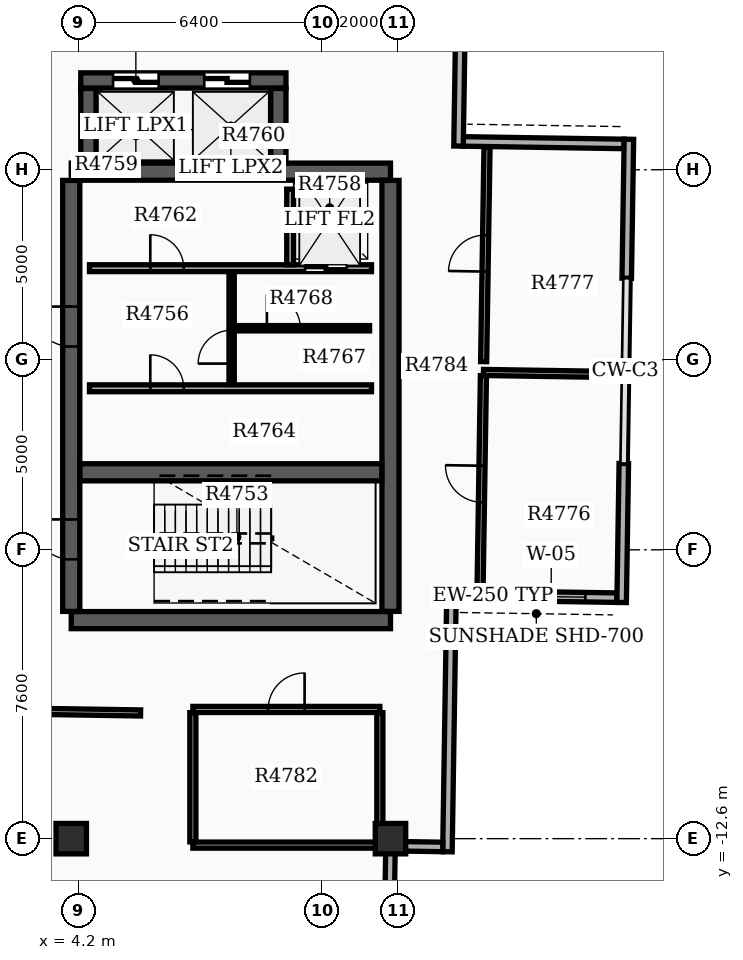
"""IFC4 building model, lengths in metres.
Left out: names, types, materials, properties, quantities, classifications, styles, units other than length and angle.
Written with IfcOpenShell. Run it as: python <this file> out.ifc"""

import sys

from ifc_helpers import new_model, si_unit, direction, frame, frame_2d, origin, origin_2d, place, context, subcontext, project, spatial, rectangle, extrude, element, fill, save


model = new_model("IFC4")
c1 = context("Model", 3, precision=1e-05, world=origin(), true_north=direction((0.0, 1.0)))
c2 = subcontext(c1, "Body", "Model", "MODEL_VIEW")
j1 = project(units=[si_unit("LENGTHUNIT", "METRE"), si_unit("PLANEANGLEUNIT", "RADIAN")], contexts=[c1])
p1 = place(None, origin())
s1 = spatial("IfcSite", under=j1, at=p1, CompositionType="ELEMENT")
p2 = place(p1, origin())
s2 = spatial("IfcBuilding", under=s1, at=p2, CompositionType="ELEMENT")
p3 = place(p2, frame((0.0, 0.0, 312.9)))
s3 = spatial("IfcBuildingStorey", under=s2, at=p3, CompositionType="ELEMENT", Elevation=312.9)
for number, where, z_axis, x_axis in (
    (1, (4.0, -6.85, 0.0), (0.0, 0.0, 1.0), (1.0, 0.0, 0.0)),
    (2, (4.0, 4.95, 0.0), (0.0, 0.0, 1.0), (1.0, 0.0, 0.0)),
):
    element("IfcWall", number, at=place(p3, frame(where, z_axis=z_axis, x_axis=x_axis)), inside=s3, PredefinedType="SHEAR", context=c2, shape_type="SweptSolid", body=[
        extrude(rectangle(XDim=8.4, YDim=0.45, at=frame_2d((4.2, 0.0))), origin(), (0.0, 0.0, 1.0), 4.25),
    ])
p4 = place(p3, frame((4.0, -6.62, 0.0), z_axis=(0.0, 0.0, 1.0), x_axis=(0.0, 1.0, 0.0)))
e3 = element("IfcWall", 3, at=p4, inside=s3, PredefinedType="SHEAR", context=c2, shape_type="SweptSolid", body=[
    extrude(rectangle(XDim=11.34, YDim=0.45, at=frame_2d((5.67, 0.0))), origin(), (0.0, 0.0, 1.0), 4.25),
])
p5 = place(p4, frame((1.37, 0.0, 0.0)))
e4 = element("IfcOpeningElement", 4, at=p5, cuts=e3, PredefinedType="OPENING", context=c2, shape_type="SweptSolid", body=[
    extrude(rectangle(XDim=1.05, YDim=2.15, at=frame_2d((0.525, 1.075))), frame((0.0, 0.235, 0.0), z_axis=(0.0, -1.0, 0.0), x_axis=(1.0, 0.0, 0.0)), (0.0, 0.0, 1.0), 0.47),
])
p6 = place(p4, frame((6.97, 0.0, 0.0)))
e5 = element("IfcOpeningElement", 5, at=p6, cuts=e3, PredefinedType="OPENING", context=c2, shape_type="SweptSolid", body=[
    extrude(rectangle(XDim=1.05, YDim=2.15, at=frame_2d((0.525, 1.075))), frame((0.0, 0.235, 0.0), z_axis=(0.0, -1.0, 0.0), x_axis=(1.0, 0.0, 0.0)), (0.0, 0.0, 1.0), 0.47),
])
p7 = place(p3, frame((12.4, -6.62, 0.0), z_axis=(0.0, 0.0, 1.0), x_axis=(0.0, 1.0, 0.0)))
e6 = element("IfcWall", 6, at=p7, inside=s3, PredefinedType="SHEAR", context=c2, shape_type="SweptSolid", body=[
    extrude(rectangle(XDim=11.34, YDim=0.45, at=frame_2d((5.67, 0.0))), origin(), (0.0, 0.0, 1.0), 4.25),
])
p8 = place(p3, frame((4.23, -2.96, 0.0), z_axis=(0.0, 0.0, 1.0), x_axis=(1.0, 0.0, 0.0)))
e7 = element("IfcWall", 7, at=p8, inside=s3, PredefinedType="SHEAR", context=c2, shape_type="SweptSolid", body=[
    extrude(rectangle(XDim=7.94, YDim=0.45, at=frame_2d((3.97, 0.0))), origin(), (0.0, 0.0, 1.0), 4.25),
])
p9 = place(p3, frame((4.45, 5.18, 0.0), z_axis=(0.0, 0.0, 1.0), x_axis=(0.0, 1.0, 0.0)))
e8 = element("IfcWall", 8, at=p9, inside=s3, PredefinedType="SHEAR", context=c2, shape_type="SweptSolid", body=[
    extrude(rectangle(XDim=1.96, YDim=0.4, at=frame_2d((0.98, 0.0))), origin(), (0.0, 0.0, 1.0), 4.25),
])
p10 = place(p3, frame((4.25, 7.35, 0.0), z_axis=(0.0, 0.0, 1.0), x_axis=(1.0, 0.0, 0.0)))
e9 = element("IfcWall", 9, at=p10, inside=s3, PredefinedType="SHEAR", context=c2, shape_type="SweptSolid", body=[
    extrude(rectangle(XDim=5.4, YDim=0.4, at=frame_2d((2.7, 0.0))), origin(), (0.0, 0.0, 1.0), 4.25),
])
p11 = place(p10, frame((0.85, 0.0, 0.0)))
e10 = element("IfcOpeningElement", 10, at=p11, cuts=e9, PredefinedType="OPENING", context=c2, shape_type="SweptSolid", body=[
    extrude(rectangle(XDim=1.2, YDim=2.2, at=frame_2d((0.6, 1.1))), frame((0.0, 0.21, 0.0), z_axis=(0.0, -1.0, 0.0), x_axis=(1.0, 0.0, 0.0)), (0.0, 0.0, 1.0), 0.42),
])
p12 = place(p10, frame((3.25, 0.0, 0.0)))
e11 = element("IfcOpeningElement", 11, at=p12, cuts=e9, PredefinedType="OPENING", context=c2, shape_type="SweptSolid", body=[
    extrude(rectangle(XDim=1.2, YDim=2.2, at=frame_2d((0.6, 1.1))), frame((0.0, 0.21, 0.0), z_axis=(0.0, -1.0, 0.0), x_axis=(1.0, 0.0, 0.0)), (0.0, 0.0, 1.0), 0.42),
])
p13 = place(p3, frame((9.45, 5.18, 0.0), z_axis=(0.0, 0.0, 1.0), x_axis=(0.0, 1.0, 0.0)))
e12 = element("IfcWall", 12, at=p13, inside=s3, PredefinedType="SHEAR", context=c2, shape_type="SweptSolid", body=[
    extrude(rectangle(XDim=1.96, YDim=0.4, at=frame_2d((0.98, 0.0))), origin(), (0.0, 0.0, 1.0), 4.25),
])
for number, where, z_axis, x_axis in (
    (13, (12.4, -12.6, 0.0), (0.0, 0.0, 1.0), (1.0, 0.0, 0.0)),
    (14, (4.0, -12.6, 0.0), (0.0, 0.0, 1.0), (1.0, 0.0, 0.0)),
):
    element("IfcColumn", number, at=place(p3, frame(where, z_axis=z_axis, x_axis=x_axis)), inside=s3, PredefinedType="COLUMN", context=c2, shape_type="SweptSolid", body=[
        extrude(rectangle(XDim=0.8, YDim=0.8, at=origin_2d()), origin(), (0.0, 0.0, 1.0), 4.5),
    ])
p14 = place(p3, frame((14.129, -6.193, 0.0), z_axis=(0.0, 0.0, 1.0), x_axis=(0.999876765821, -0.015698827078, 0.0)))
e15 = element("IfcWall", 15, at=p14, inside=s3, PredefinedType="STANDARD", context=c2, shape_type="SweptSolid", body=[
    extrude(rectangle(XDim=4.23, YDim=0.25, at=frame_2d((2.115, 0.0))), origin(), (0.0, 0.0, 1.0), 3.73),
])
p15 = place(p14, frame((1.6, 0.0, 0.8)))
e16 = element("IfcOpeningElement", 16, at=p15, cuts=e15, PredefinedType="OPENING", context=c2, shape_type="SweptSolid", body=[
    extrude(rectangle(XDim=1.8, YDim=1.8, at=frame_2d((0.9, 0.9))), frame((0.0, 0.135, 0.0), z_axis=(0.0, -1.0, 0.0), x_axis=(1.0, 0.0, 0.0)), (0.0, 0.0, 1.0), 0.27),
])
p16 = place(p3, frame((18.546, 5.679, 0.0), z_axis=(0.0, 0.0, 1.0), x_axis=(-0.999876765821, 0.015698827078, 0.0)))
e17 = element("IfcWall", 17, at=p16, inside=s3, PredefinedType="STANDARD", context=c2, shape_type="SweptSolid", body=[
    extrude(rectangle(XDim=4.23, YDim=0.25, at=frame_2d((2.115, 0.0))), origin(), (0.0, 0.0, 1.0), 3.73),
])
p17 = place(p3, frame((18.482, -6.386, 0.0), z_axis=(0.0, 0.0, 1.0), x_axis=(0.015688794617, 0.999876923288, 0.0)))
e18 = element("IfcWall", 18, at=p17, inside=s3, PredefinedType="STANDARD", context=c2, shape_type="SweptSolid", body=[
    extrude(rectangle(XDim=3.657, YDim=0.25, at=frame_2d((1.829, 0.0))), origin(), (0.0, 0.0, 1.0), 3.73),
])
p18 = place(p3, frame((18.616, 2.146, 0.0), z_axis=(0.0, 0.0, 1.0), x_axis=(0.015687747418, 0.999876939719, 0.0)))
e19 = element("IfcWall", 19, at=p18, inside=s3, PredefinedType="STANDARD", context=c2, shape_type="SweptSolid", body=[
    extrude(rectangle(XDim=3.657, YDim=0.25, at=frame_2d((1.829, 0.0))), origin(), (0.0, 0.0, 1.0), 3.73),
])
p19 = place(p3, frame((14.19, 5.623, 0.0), z_axis=(0.0, 0.0, 1.0), x_axis=(0.015684623239, 0.999876988731, 0.0)))
e20 = element("IfcWall", 20, at=p19, inside=s3, PredefinedType="STANDARD", context=c2, shape_type="SweptSolid", body=[
    extrude(rectangle(XDim=6.88, YDim=0.25, at=frame_2d((3.44, 0.0))), origin(), (0.0, 0.0, 1.0), 3.73),
])
p20 = place(p3, frame((14.007, -6.066, 0.0), z_axis=(0.0, 0.0, 1.0), x_axis=(-0.01572065784, -0.999876422823, 0.0)))
e21 = element("IfcWall", 21, at=p20, inside=s3, PredefinedType="STANDARD", context=c2, shape_type="SweptSolid", body=[
    extrude(rectangle(XDim=6.88, YDim=0.25, at=frame_2d((3.44, 0.0))), origin(), (0.0, 0.0, 1.0), 3.73),
])
p21 = place(p3, frame((13.775, -12.818, 0.0), z_axis=(0.0, 0.0, 1.0), x_axis=(-0.999874882342, 0.0158183331, 0.0)))
e22 = element("IfcWall", 22, at=p21, inside=s3, PredefinedType="STANDARD", context=c2, shape_type="SweptSolid", body=[
    extrude(rectangle(XDim=1.25, YDim=0.25, at=frame_2d((0.625, 0.0))), origin(), (0.0, 0.0, 1.0), 3.73),
])
p22 = place(p3, frame((12.399, -12.921, 0.0), z_axis=(0.0, 0.0, 1.0), x_axis=(-0.015788362288, -0.99987535604, 0.0)))
e23 = element("IfcWall", 23, at=p22, inside=s3, PredefinedType="STANDARD", context=c2, shape_type="SweptSolid", body=[
    extrude(rectangle(XDim=1.5, YDim=0.25, at=frame_2d((0.75, 0.0))), origin(), (0.0, 0.0, 1.0), 3.73),
])
p23 = place(p3, frame((4.48, 2.41, 0.0), z_axis=(0.0, 0.0, 1.0), x_axis=(1.0, 0.0, 0.0)))
e24 = element("IfcWall", 24, at=p23, inside=s3, PredefinedType="SOLIDWALL", context=c2, shape_type="SweptSolid", body=[
    extrude(rectangle(XDim=7.42, YDim=0.18, at=frame_2d((3.71, 0.0))), origin(), (0.0, 0.0, 1.0), 3.72),
])
p24 = place(p23, frame((5.67, 0.0, 0.0)))
e25 = element("IfcOpeningElement", 25, at=p24, cuts=e24, PredefinedType="OPENING", context=c2, shape_type="SweptSolid", body=[
    extrude(rectangle(XDim=1.1, YDim=2.15, at=frame_2d((0.55, 1.075))), frame((0.0, 0.1, 0.0), z_axis=(0.0, -1.0, 0.0), x_axis=(1.0, 0.0, 0.0)), (0.0, 0.0, 1.0), 0.2),
])
p25 = place(p23, frame((1.6, 0.0, 0.0)))
e26 = element("IfcOpeningElement", 26, at=p25, cuts=e24, PredefinedType="OPENING", context=c2, shape_type="SweptSolid", body=[
    extrude(rectangle(XDim=0.88, YDim=2.1, at=frame_2d((0.44, 1.05))), frame((0.0, 0.1, 0.0), z_axis=(0.0, -1.0, 0.0), x_axis=(1.0, 0.0, 0.0)), (0.0, 0.0, 1.0), 0.2),
])
p26 = place(p3, frame((4.48, -0.75, 0.0), z_axis=(0.0, 0.0, 1.0), x_axis=(1.0, 0.0, 0.0)))
e27 = element("IfcWall", 27, at=p26, inside=s3, PredefinedType="SOLIDWALL", context=c2, shape_type="SweptSolid", body=[
    extrude(rectangle(XDim=7.42, YDim=0.18, at=frame_2d((3.71, 0.0))), origin(), (0.0, 0.0, 1.0), 3.72),
])
p27 = place(p26, frame((1.6, 0.0, 0.0)))
e28 = element("IfcOpeningElement", 28, at=p27, cuts=e27, PredefinedType="OPENING", context=c2, shape_type="SweptSolid", body=[
    extrude(rectangle(XDim=0.88, YDim=2.1, at=frame_2d((0.44, 1.05))), frame((0.0, 0.1, 0.0), z_axis=(0.0, -1.0, 0.0), x_axis=(1.0, 0.0, 0.0)), (0.0, 0.0, 1.0), 0.2),
])
p28 = place(p3, frame((9.76, 2.5, 0.0), z_axis=(0.0, 0.0, 1.0), x_axis=(0.0, 1.0, 0.0)))
e29 = element("IfcWall", 29, at=p28, inside=s3, PredefinedType="SOLIDWALL", context=c2, shape_type="SweptSolid", body=[
    extrude(rectangle(XDim=1.99, YDim=0.18, at=frame_2d((0.995, 0.0))), origin(), (0.0, 0.0, 1.0), 3.72),
])
p29 = place(p3, frame((8.22, -0.65, 0.0), z_axis=(0.0, 0.0, 1.0), x_axis=(0.0, 1.0, 0.0)))
e30 = element("IfcWall", 30, at=p29, inside=s3, PredefinedType="SOLIDWALL", context=c2, shape_type="SweptSolid", body=[
    extrude(rectangle(XDim=2.96, YDim=0.14, at=frame_2d((1.48, 0.0))), origin(), (0.0, 0.0, 1.0), 3.72),
])
p30 = place(p29, frame((0.55, 0.0, 0.0)))
e31 = element("IfcOpeningElement", 31, at=p30, cuts=e30, PredefinedType="OPENING", context=c2, shape_type="SweptSolid", body=[
    extrude(rectangle(XDim=0.88, YDim=2.1, at=frame_2d((0.44, 1.05))), frame((0.0, 0.08, 0.0), z_axis=(0.0, -1.0, 0.0), x_axis=(1.0, 0.0, 0.0)), (0.0, 0.0, 1.0), 0.16),
])
p31 = place(p3, frame((8.298, 0.83, 0.0), z_axis=(0.0, 0.0, 1.0), x_axis=(1.0, 0.0, 0.0)))
e32 = element("IfcWall", 32, at=p31, inside=s3, PredefinedType="PARTITIONING", context=c2, shape_type="SweptSolid", body=[
    extrude(rectangle(XDim=3.552, YDim=0.14, at=frame_2d((1.776, 0.0))), origin(), (0.0, 0.0, 1.0), 3.72),
])
p32 = place(p31, frame((0.85, 0.0, 0.0)))
e33 = element("IfcOpeningElement", 33, at=p32, cuts=e32, PredefinedType="OPENING", context=c2, shape_type="SweptSolid", body=[
    extrude(rectangle(XDim=0.88, YDim=2.1, at=frame_2d((0.44, 1.05))), frame((0.0, 0.08, 0.0), z_axis=(0.0, -1.0, 0.0), x_axis=(1.0, 0.0, 0.0)), (0.0, 0.0, 1.0), 0.16),
])
p33 = place(p3, frame((-0.044, -9.2, 0.0), z_axis=(0.0, 0.0, 1.0), x_axis=(0.999877057035, -0.015680268324, 0.0)))
e34 = element("IfcWall", 34, at=p33, inside=s3, PredefinedType="PARTITIONING", context=c2, shape_type="SweptSolid", body=[
    extrude(rectangle(XDim=5.87, YDim=0.16, at=frame_2d((2.935, 0.0))), origin(), (0.0, 0.0, 1.0), 3.72),
])
p34 = place(p33, frame((2.455, 0.0, 0.0)))
e35 = element("IfcOpeningElement", 35, at=p34, cuts=e34, PredefinedType="OPENING", context=c2, shape_type="SweptSolid", body=[
    extrude(rectangle(XDim=0.96, YDim=2.15, at=frame_2d((0.48, 1.075))), frame((0.0, 0.09, 0.0), z_axis=(0.0, -1.0, 0.0), x_axis=(1.0, 0.0, 0.0)), (0.0, 0.0, 1.0), 0.18),
])
p35 = place(p3, frame((14.847, -0.333, 0.0), z_axis=(0.0, 0.0, 1.0), x_axis=(0.999876606353, -0.015708980461, 0.0)))
e36 = element("IfcWall", 36, at=p35, inside=s3, PredefinedType="PARTITIONING", context=c2, shape_type="SweptSolid", body=[
    extrude(rectangle(XDim=3.73, YDim=0.16, at=frame_2d((1.865, 0.0))), origin(), (0.0, 0.0, 1.0), 3.72),
])
p36 = place(p3, frame((14.757, -6.07, 0.0), z_axis=(0.0, 0.0, 1.0), x_axis=(0.01567977253, 0.99987706481, 0.0)))
e37 = element("IfcWall", 37, at=p36, inside=s3, PredefinedType="PARTITIONING", context=c2, shape_type="SweptSolid", body=[
    extrude(rectangle(XDim=5.652, YDim=0.16, at=frame_2d((2.826, 0.0))), origin(), (0.0, 0.0, 1.0), 3.72),
])
p37 = place(p36, frame((2.322, 0.0, 0.0)))
e38 = element("IfcOpeningElement", 38, at=p37, cuts=e37, PredefinedType="OPENING", context=c2, shape_type="SweptSolid", body=[
    extrude(rectangle(XDim=0.96, YDim=2.15, at=frame_2d((0.48, 1.075))), frame((0.0, 0.09, 0.0), z_axis=(0.0, -1.0, 0.0), x_axis=(1.0, 0.0, 0.0)), (0.0, 0.0, 1.0), 0.18),
])
p38 = place(p3, frame((14.851, -0.048, 0.0), z_axis=(0.0, 0.0, 1.0), x_axis=(0.01567977253, 0.99987706481, 0.0)))
e39 = element("IfcWall", 39, at=p38, inside=s3, PredefinedType="PARTITIONING", context=c2, shape_type="SweptSolid", body=[
    extrude(rectangle(XDim=5.652, YDim=0.16, at=frame_2d((2.826, 0.0))), origin(), (0.0, 0.0, 1.0), 3.72),
])
p39 = place(p38, frame((2.37, 0.0, 0.0)))
e40 = element("IfcOpeningElement", 40, at=p39, cuts=e39, PredefinedType="OPENING", context=c2, shape_type="SweptSolid", body=[
    extrude(rectangle(XDim=0.96, YDim=2.15, at=frame_2d((0.48, 1.075))), frame((0.0, 0.09, 0.0), z_axis=(0.0, -1.0, 0.0), x_axis=(1.0, 0.0, 0.0)), (0.0, 0.0, 1.0), 0.18),
])
p40 = place(p3, frame((7.2, -12.77, 0.0), z_axis=(0.0, 0.0, 1.0), x_axis=(1.0, 0.0, 0.0)))
e41 = element("IfcWall", 41, at=p40, inside=s3, PredefinedType="PARTITIONING", context=c2, shape_type="SweptSolid", body=[
    extrude(rectangle(XDim=4.92, YDim=0.16, at=frame_2d((2.46, 0.0))), origin(), (0.0, 0.0, 1.0), 3.72),
])
p41 = place(p3, frame((7.2, -9.2, 0.0), z_axis=(0.0, 0.0, 1.0), x_axis=(1.0, 0.0, 0.0)))
e42 = element("IfcWall", 42, at=p41, inside=s3, PredefinedType="PARTITIONING", context=c2, shape_type="SweptSolid", body=[
    extrude(rectangle(XDim=4.92, YDim=0.16, at=frame_2d((2.46, 0.0))), origin(), (0.0, 0.0, 1.0), 3.72),
])
p42 = place(p41, frame((1.98, 0.0, 0.0)))
e43 = element("IfcOpeningElement", 43, at=p42, cuts=e42, PredefinedType="OPENING", context=c2, shape_type="SweptSolid", body=[
    extrude(rectangle(XDim=0.96, YDim=2.15, at=frame_2d((0.48, 1.075))), frame((0.0, 0.09, 0.0), z_axis=(0.0, -1.0, 0.0), x_axis=(1.0, 0.0, 0.0)), (0.0, 0.0, 1.0), 0.18),
])
for number, where, z_axis, x_axis in (
    (44, (7.2, -12.685, 0.0), (0.0, 0.0, 1.0), (0.0, 1.0, 0.0)),
    (45, (12.12, -12.685, 0.0), (0.0, 0.0, 1.0), (0.0, 1.0, 0.0)),
):
    element("IfcWall", number, at=place(p3, frame(where, z_axis=z_axis, x_axis=x_axis)), inside=s3, PredefinedType="PARTITIONING", context=c2, shape_type="SweptSolid", body=[
        extrude(rectangle(XDim=3.4, YDim=0.16, at=frame_2d((1.7, 0.0))), origin(), (0.0, 0.0, 1.0), 3.72),
    ])
p43 = place(p15, origin())
e46 = element("IfcWindow", 46, at=p43, inside=s3, PartitioningType="SINGLE_PANEL", PredefinedType="WINDOW", context=c2, shape_type="SweptSolid", body=[
    extrude(rectangle(XDim=1.8, YDim=1.8, at=frame_2d((0.9, 0.9))), frame((0.0, 0.03, 0.0), z_axis=(0.0, -1.0, 0.0), x_axis=(1.0, 0.0, 0.0)), (0.0, 0.0, 1.0), 0.06),
])
fill(e16, e46)
p44 = place(p5, origin())
e47 = element("IfcDoor", 47, at=p44, inside=s3, OperationType="SINGLE_SWING_RIGHT", PredefinedType="DOOR", context=c2, shape_type="SweptSolid", body=[
    extrude(rectangle(XDim=1.05, YDim=2.15, at=frame_2d((0.525, 1.075))), frame((0.0, 0.025, 0.0), z_axis=(0.0, -1.0, 0.0), x_axis=(1.0, 0.0, 0.0)), (0.0, 0.0, 1.0), 0.05),
])
fill(e4, e47)
p45 = place(p6, origin())
e48 = element("IfcDoor", 48, at=p45, inside=s3, OperationType="SINGLE_SWING_RIGHT", PredefinedType="DOOR", context=c2, shape_type="SweptSolid", body=[
    extrude(rectangle(XDim=1.05, YDim=2.15, at=frame_2d((0.525, 1.075))), frame((0.0, 0.025, 0.0), z_axis=(0.0, -1.0, 0.0), x_axis=(1.0, 0.0, 0.0)), (0.0, 0.0, 1.0), 0.05),
])
fill(e5, e48)
p46 = place(p24, origin())
e49 = element("IfcDoor", 49, at=p46, inside=s3, OperationType="DOUBLE_DOOR_SLIDING", PredefinedType="DOOR", context=c2, shape_type="SweptSolid", body=[
    extrude(rectangle(XDim=1.1, YDim=2.15, at=frame_2d((0.55, 1.075))), frame((0.0, 0.025, 0.0), z_axis=(0.0, -1.0, 0.0), x_axis=(1.0, 0.0, 0.0)), (0.0, 0.0, 1.0), 0.05),
])
fill(e25, e49)
p47 = place(p11, origin())
e50 = element("IfcDoor", 50, at=p47, inside=s3, OperationType="DOUBLE_DOOR_SLIDING", PredefinedType="DOOR", context=c2, shape_type="SweptSolid", body=[
    extrude(rectangle(XDim=1.2, YDim=2.2, at=frame_2d((0.6, 1.1))), frame((0.0, 0.025, 0.0), z_axis=(0.0, -1.0, 0.0), x_axis=(1.0, 0.0, 0.0)), (0.0, 0.0, 1.0), 0.05),
])
fill(e10, e50)
p48 = place(p12, origin())
e51 = element("IfcDoor", 51, at=p48, inside=s3, OperationType="DOUBLE_DOOR_SLIDING", PredefinedType="DOOR", context=c2, shape_type="SweptSolid", body=[
    extrude(rectangle(XDim=1.2, YDim=2.2, at=frame_2d((0.6, 1.1))), frame((0.0, 0.025, 0.0), z_axis=(0.0, -1.0, 0.0), x_axis=(1.0, 0.0, 0.0)), (0.0, 0.0, 1.0), 0.05),
])
fill(e11, e51)
p49 = place(p25, origin())
e52 = element("IfcDoor", 52, at=p49, inside=s3, OperationType="SINGLE_SWING_LEFT", PredefinedType="DOOR", context=c2, shape_type="SweptSolid", body=[
    extrude(rectangle(XDim=0.88, YDim=2.1, at=frame_2d((0.44, 1.05))), frame((0.0, 0.025, 0.0), z_axis=(0.0, -1.0, 0.0), x_axis=(1.0, 0.0, 0.0)), (0.0, 0.0, 1.0), 0.05),
])
fill(e26, e52)
p50 = place(p27, origin())
e53 = element("IfcDoor", 53, at=p50, inside=s3, OperationType="SINGLE_SWING_LEFT", PredefinedType="DOOR", context=c2, shape_type="SweptSolid", body=[
    extrude(rectangle(XDim=0.88, YDim=2.1, at=frame_2d((0.44, 1.05))), frame((0.0, 0.025, 0.0), z_axis=(0.0, -1.0, 0.0), x_axis=(1.0, 0.0, 0.0)), (0.0, 0.0, 1.0), 0.05),
])
fill(e28, e53)
p51 = place(p30, origin())
e54 = element("IfcDoor", 54, at=p51, inside=s3, OperationType="SINGLE_SWING_LEFT", PredefinedType="DOOR", context=c2, shape_type="SweptSolid", body=[
    extrude(rectangle(XDim=0.88, YDim=2.1, at=frame_2d((0.44, 1.05))), frame((0.0, 0.025, 0.0), z_axis=(0.0, -1.0, 0.0), x_axis=(1.0, 0.0, 0.0)), (0.0, 0.0, 1.0), 0.05),
])
fill(e31, e54)
p52 = place(p32, origin())
e55 = element("IfcDoor", 55, at=p52, inside=s3, OperationType="SINGLE_SWING_LEFT", PredefinedType="DOOR", context=c2, shape_type="SweptSolid", body=[
    extrude(rectangle(XDim=0.88, YDim=2.1, at=frame_2d((0.44, 1.05))), frame((0.0, 0.025, 0.0), z_axis=(0.0, -1.0, 0.0), x_axis=(1.0, 0.0, 0.0)), (0.0, 0.0, 1.0), 0.05),
])
fill(e33, e55)
p53 = place(p37, origin())
e56 = element("IfcDoor", 56, at=p53, inside=s3, OperationType="SINGLE_SWING_RIGHT", PredefinedType="DOOR", context=c2, shape_type="SweptSolid", body=[
    extrude(rectangle(XDim=0.96, YDim=2.15, at=frame_2d((0.48, 1.075))), frame((0.0, 0.025, 0.0), z_axis=(0.0, -1.0, 0.0), x_axis=(1.0, 0.0, 0.0)), (0.0, 0.0, 1.0), 0.05),
])
fill(e38, e56)
p54 = place(p39, origin())
e57 = element("IfcDoor", 57, at=p54, inside=s3, OperationType="SINGLE_SWING_LEFT", PredefinedType="DOOR", context=c2, shape_type="SweptSolid", body=[
    extrude(rectangle(XDim=0.96, YDim=2.15, at=frame_2d((0.48, 1.075))), frame((0.0, 0.025, 0.0), z_axis=(0.0, -1.0, 0.0), x_axis=(1.0, 0.0, 0.0)), (0.0, 0.0, 1.0), 0.05),
])
fill(e40, e57)
p55 = place(p42, origin())
e58 = element("IfcDoor", 58, at=p55, inside=s3, OperationType="SINGLE_SWING_RIGHT", PredefinedType="DOOR", context=c2, shape_type="SweptSolid", body=[
    extrude(rectangle(XDim=0.96, YDim=2.15, at=frame_2d((0.48, 1.075))), frame((0.0, 0.025, 0.0), z_axis=(0.0, -1.0, 0.0), x_axis=(1.0, 0.0, 0.0)), (0.0, 0.0, 1.0), 0.05),
])
fill(e43, e58)
save(model, sys.argv[1])
